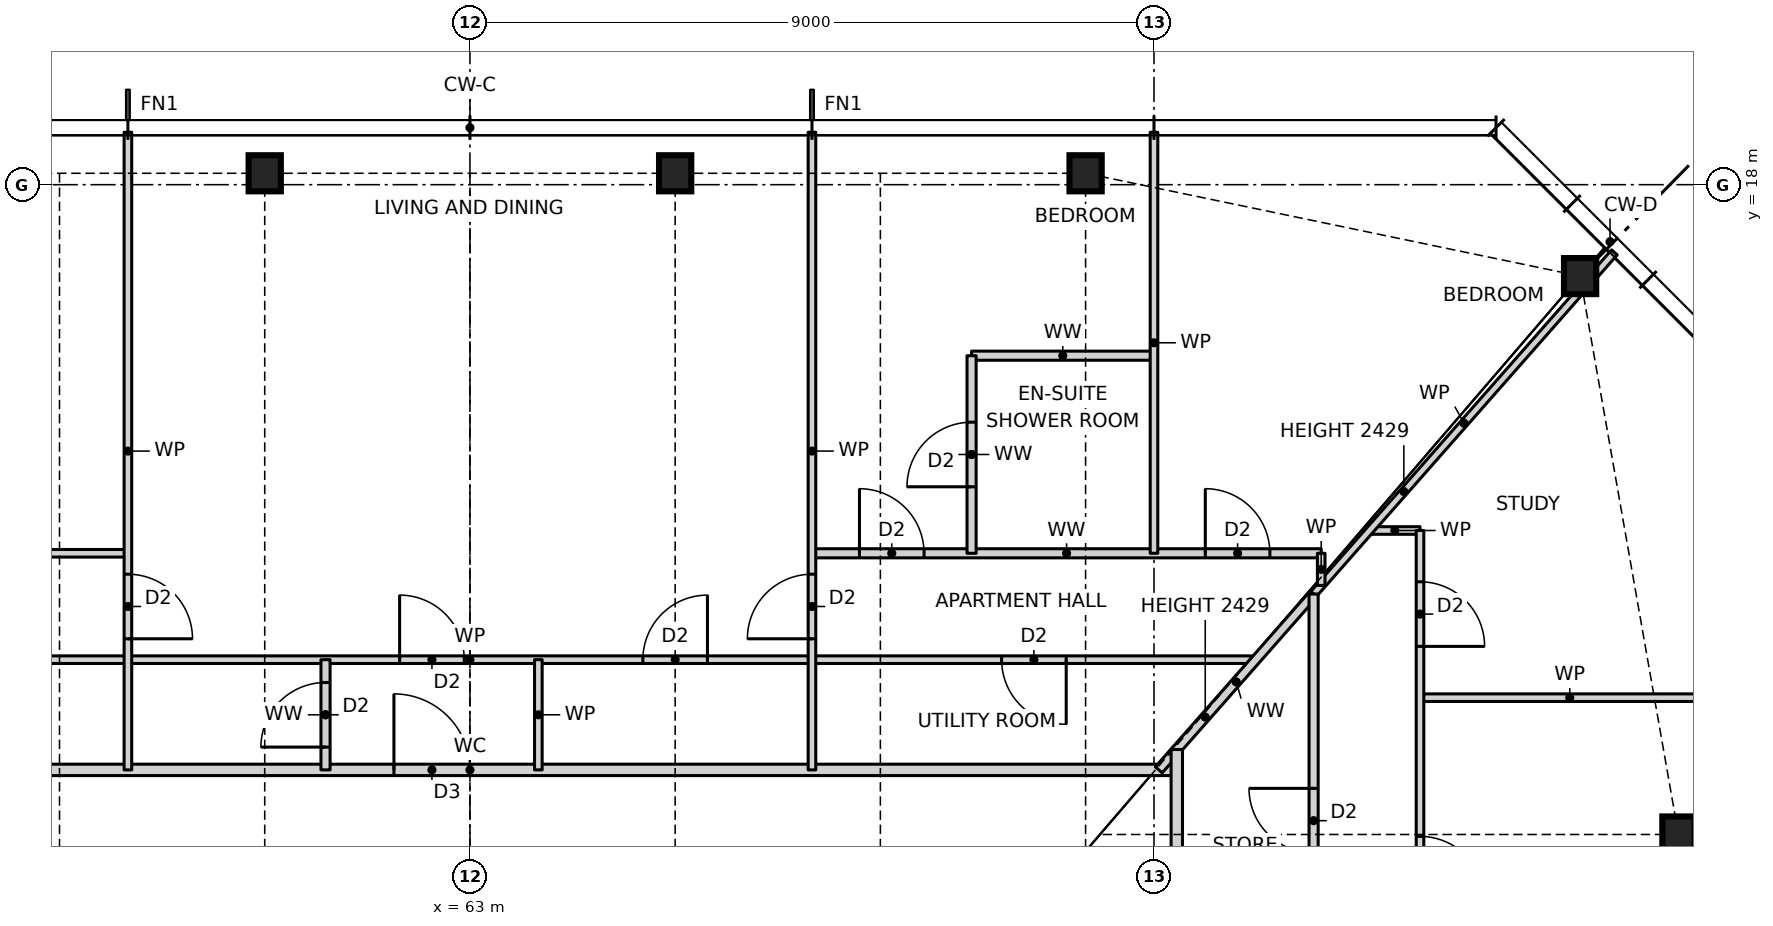
"""IFC4 building model, lengths in metres.
Left out: names, types, materials, properties, quantities, classifications, styles, units other than length and angle.
Written with IfcOpenShell. Run it as: python <this file> out.ifc"""

import sys

from ifc_helpers import new_model, si_unit, direction, frame, frame_2d, origin, origin_2d, place, context, subcontext, project, spatial, rectangle, i_section, extrude, element, fill, save


model = new_model("IFC4")
c1 = context("Model", 3, precision=1e-05, world=origin(), true_north=direction((0.0, 1.0)))
c2 = subcontext(c1, "Body", "Model", "MODEL_VIEW")
j1 = project(units=[si_unit("LENGTHUNIT", "METRE"), si_unit("PLANEANGLEUNIT", "RADIAN")], contexts=[c1])
p1 = place(None, origin())
s1 = spatial("IfcSite", under=j1, at=p1, CompositionType="ELEMENT")
p2 = place(p1, origin())
s2 = spatial("IfcBuilding", under=s1, at=p2, CompositionType="ELEMENT")
p3 = place(p2, frame((0.0, 0.0, 29.0)))
s3 = spatial("IfcBuildingStorey", under=s2, at=p3, CompositionType="ELEMENT", Elevation=29.0)
for number, where, z_axis, x_axis in (
    (1, (78.9, 9.45, 0.0), (0.0, 0.0, 1.0), (1.0, 0.0, 0.0)),
    (2, (77.606, 16.797, 0.0), (0.0, 0.0, 1.0), (1.0, 0.0, 0.0)),
    (3, (71.1, 18.15, 0.0), (0.0, 0.0, 1.0), (1.0, 0.0, 0.0)),
    (4, (65.7, 18.15, 0.0), (0.0, 0.0, 1.0), (1.0, 0.0, 0.0)),
    (5, (60.3, 18.15, 0.0), (0.0, 0.0, 1.0), (1.0, 0.0, 0.0)),
):
    element("IfcColumn", number, at=place(p3, frame(where, z_axis=z_axis, x_axis=x_axis)), inside=s3, PredefinedType="COLUMN", context=c2, shape_type="SweptSolid", body=[
        extrude(i_section(OverallWidth=0.424, OverallDepth=0.475, WebThickness=0.048, FlangeThickness=0.077, at=origin_2d()), origin(), (0.0, 0.0, 1.0), 3.5),
    ])
p4 = place(p3, frame((53.7, 10.3, 0.0), z_axis=(0.0, 0.0, 1.0), x_axis=(1.0, 0.0, 0.0)))
e6 = element("IfcWall", 6, at=p4, inside=s3, PredefinedType="PARTITIONING", context=c2, shape_type="SweptSolid", body=[
    extrude(rectangle(XDim=18.6, YDim=0.15, at=frame_2d((9.3, 0.0))), origin(), (0.0, 0.0, 1.0), 3.27),
])
p5 = place(p4, frame((8.3, 0.0, 0.0)))
e7 = element("IfcOpeningElement", 7, at=p5, cuts=e6, PredefinedType="OPENING", context=c2, shape_type="SweptSolid", body=[
    extrude(rectangle(XDim=1.0, YDim=2.1, at=frame_2d((0.5, 1.05))), frame((0.0, 0.085, 0.0), z_axis=(0.0, -1.0, 0.0), x_axis=(1.0, 0.0, 0.0)), (0.0, 0.0, 1.0), 0.17),
])
p6 = place(p3, frame((75.5, 11.25, 0.0), z_axis=(0.0, 0.0, 1.0), x_axis=(1.0, 0.0, 0.0)))
e8 = element("IfcWall", 8, at=p6, inside=s3, PredefinedType="PARTITIONING", context=c2, shape_type="SweptSolid", body=[
    extrude(rectangle(XDim=3.94, YDim=0.1, at=frame_2d((1.97, 0.0))), origin(), (0.0, 0.0, 1.0), 3.27),
])
p7 = place(p3, frame((52.66, 11.75, 0.0), z_axis=(0.0, 0.0, 1.0), x_axis=(1.0, 0.0, 0.0)))
e9 = element("IfcWall", 9, at=p7, inside=s3, PredefinedType="PARTITIONING", context=c2, shape_type="SweptSolid", body=[
    extrude(rectangle(XDim=20.68, YDim=0.1, at=frame_2d((10.34, 0.0))), origin(), (0.0, 0.0, 1.0), 3.27),
])
p8 = place(p7, frame((12.615, 0.0, 0.0)))
e10 = element("IfcOpeningElement", 10, at=p8, cuts=e9, PredefinedType="OPENING", context=c2, shape_type="SweptSolid", body=[
    extrude(rectangle(XDim=0.85, YDim=2.1, at=frame_2d((0.425, 1.05))), frame((0.0, 0.06, 0.0), z_axis=(0.0, -1.0, 0.0), x_axis=(1.0, 0.0, 0.0)), (0.0, 0.0, 1.0), 0.12),
])
p9 = place(p7, frame((9.415, 0.0, 0.0)))
e11 = element("IfcOpeningElement", 11, at=p9, cuts=e9, PredefinedType="OPENING", context=c2, shape_type="SweptSolid", body=[
    extrude(rectangle(XDim=0.85, YDim=2.1, at=frame_2d((0.425, 1.05))), frame((0.0, 0.06, 0.0), z_axis=(0.0, -1.0, 0.0), x_axis=(1.0, 0.0, 0.0)), (0.0, 0.0, 1.0), 0.12),
])
p10 = place(p7, frame((17.335, 0.0, 0.0)))
e12 = element("IfcOpeningElement", 12, at=p10, cuts=e9, PredefinedType="OPENING", context=c2, shape_type="SweptSolid", body=[
    extrude(rectangle(XDim=0.85, YDim=2.1, at=frame_2d((0.425, 1.05))), frame((0.0, 0.06, 0.0), z_axis=(0.0, -1.0, 0.0), x_axis=(1.0, 0.0, 0.0)), (0.0, 0.0, 1.0), 0.12),
])
p11 = place(p7, frame((2.495, 0.0, 0.0)))
e13 = element("IfcOpeningElement", 13, at=p11, cuts=e9, PredefinedType="OPENING", context=c2, shape_type="SweptSolid", body=[
    extrude(rectangle(XDim=0.85, YDim=2.1, at=frame_2d((0.425, 1.05))), frame((0.0, 0.06, 0.0), z_axis=(0.0, -1.0, 0.0), x_axis=(1.0, 0.0, 0.0)), (0.0, 0.0, 1.0), 0.12),
])
p12 = place(p3, frame((51.8, 13.15, 0.0), z_axis=(0.0, 0.0, 1.0), x_axis=(1.0, 0.0, 0.0)))
e14 = element("IfcWall", 14, at=p12, inside=s3, PredefinedType="PARTITIONING", context=c2, shape_type="SweptSolid", body=[
    extrude(rectangle(XDim=6.7, YDim=0.1, at=frame_2d((3.35, 0.0))), origin(), (0.0, 0.0, 1.0), 3.27),
])
p13 = place(p12, frame((4.025, 0.0, 0.0)))
e15 = element("IfcOpeningElement", 15, at=p13, cuts=e14, PredefinedType="OPENING", context=c2, shape_type="SweptSolid", body=[
    extrude(rectangle(XDim=0.85, YDim=2.1, at=frame_2d((0.425, 1.05))), frame((0.0, 0.06, 0.0), z_axis=(0.0, -1.0, 0.0), x_axis=(1.0, 0.0, 0.0)), (0.0, 0.0, 1.0), 0.12),
])
p14 = place(p12, frame((0.675, 0.0, 0.0)))
e16 = element("IfcOpeningElement", 16, at=p14, cuts=e14, PredefinedType="OPENING", context=c2, shape_type="SweptSolid", body=[
    extrude(rectangle(XDim=0.85, YDim=2.1, at=frame_2d((0.425, 1.05))), frame((0.0, 0.06, 0.0), z_axis=(0.0, -1.0, 0.0), x_axis=(1.0, 0.0, 0.0)), (0.0, 0.0, 1.0), 0.12),
])
p15 = place(p3, frame((67.5, 13.15, 0.0), z_axis=(0.0, 0.0, 1.0), x_axis=(1.0, 0.0, 0.0)))
e17 = element("IfcWall", 17, at=p15, inside=s3, PredefinedType="PARTITIONING", context=c2, shape_type="SweptSolid", body=[
    extrude(rectangle(XDim=6.7, YDim=0.12, at=frame_2d((3.35, 0.0))), origin(), (0.0, 0.0, 1.0), 3.27),
])
p16 = place(p15, frame((0.625, 0.0, 0.0)))
e18 = element("IfcOpeningElement", 18, at=p16, cuts=e17, PredefinedType="OPENING", context=c2, shape_type="SweptSolid", body=[
    extrude(rectangle(XDim=0.85, YDim=2.1, at=frame_2d((0.425, 1.05))), frame((0.0, 0.07, 0.0), z_axis=(0.0, -1.0, 0.0), x_axis=(1.0, 0.0, 0.0)), (0.0, 0.0, 1.0), 0.14),
])
p17 = place(p15, frame((5.175, 0.0, 0.0)))
e19 = element("IfcOpeningElement", 19, at=p17, cuts=e17, PredefinedType="OPENING", context=c2, shape_type="SweptSolid", body=[
    extrude(rectangle(XDim=0.85, YDim=2.1, at=frame_2d((0.425, 1.05))), frame((0.0, 0.07, 0.0), z_axis=(0.0, -1.0, 0.0), x_axis=(1.0, 0.0, 0.0)), (0.0, 0.0, 1.0), 0.14),
])
p18 = place(p3, frame((74.836, 13.45, 0.0), z_axis=(0.0, 0.0, 1.0), x_axis=(1.0, 0.0, 0.0)))
e20 = element("IfcWall", 20, at=p18, inside=s3, PredefinedType="PARTITIONING", context=c2, shape_type="SweptSolid", body=[
    extrude(rectangle(XDim=0.664, YDim=0.1, at=frame_2d((0.332, 0.0))), origin(), (0.0, 0.0, 1.0), 3.27),
])
p19 = place(p3, frame((69.6, 15.75, 0.0), z_axis=(0.0, 0.0, 1.0), x_axis=(1.0, 0.0, 0.0)))
e21 = element("IfcWall", 21, at=p19, inside=s3, PredefinedType="PARTITIONING", context=c2, shape_type="SweptSolid", body=[
    extrude(rectangle(XDim=2.4, YDim=0.12, at=frame_2d((1.2, 0.0))), origin(), (0.0, 0.0, 1.0), 3.27),
])
p20 = place(p3, frame((74.1, 12.614, 0.0), z_axis=(0.0, 0.0, 1.0), x_axis=(0.660755619739, 0.750601099775, 0.0)))
e22 = element("IfcWall", 22, at=p20, inside=s3, PredefinedType="PARTITIONING", context=c2, shape_type="SweptSolid", body=[
    extrude(rectangle(XDim=5.989, YDim=0.1, at=frame_2d((2.995, 0.0))), origin(), (0.0, 0.0, 1.0), 2.429),
])
p21 = place(p3, frame((72.063, 10.301, 0.0), z_axis=(0.0, 0.0, 1.0), x_axis=(0.660761820138, 0.750595641506, 0.0)))
e23 = element("IfcWall", 23, at=p21, inside=s3, PredefinedType="PARTITIONING", context=c2, shape_type="SweptSolid", body=[
    extrude(rectangle(XDim=3.082, YDim=0.12, at=frame_2d((1.541, 0.0))), origin(), (0.0, 0.0, 1.0), 2.429),
])
p22 = place(p3, frame((75.5, 2.25, 0.0), z_axis=(0.0, 0.0, 1.0), x_axis=(0.0, 1.0, 0.0)))
e24 = element("IfcWall", 24, at=p22, inside=s3, PredefinedType="PARTITIONING", context=c2, shape_type="SweptSolid", body=[
    extrude(rectangle(XDim=11.2, YDim=0.1, at=frame_2d((5.6, 0.0))), origin(), (0.0, 0.0, 1.0), 3.27),
])
p23 = place(p22, frame((1.825, 0.0, 0.0)))
e25 = element("IfcOpeningElement", 25, at=p23, cuts=e24, PredefinedType="OPENING", context=c2, shape_type="SweptSolid", body=[
    extrude(rectangle(XDim=0.85, YDim=2.1, at=frame_2d((0.425, 1.05))), frame((0.0, 0.06, 0.0), z_axis=(0.0, -1.0, 0.0), x_axis=(1.0, 0.0, 0.0)), (0.0, 0.0, 1.0), 0.12),
])
p24 = place(p22, frame((6.325, 0.0, 0.0)))
e26 = element("IfcOpeningElement", 26, at=p24, cuts=e24, PredefinedType="OPENING", context=c2, shape_type="SweptSolid", body=[
    extrude(rectangle(XDim=0.85, YDim=2.1, at=frame_2d((0.425, 1.05))), frame((0.0, 0.06, 0.0), z_axis=(0.0, -1.0, 0.0), x_axis=(1.0, 0.0, 0.0)), (0.0, 0.0, 1.0), 0.12),
])
p25 = place(p22, frame((9.675, 0.0, 0.0)))
e27 = element("IfcOpeningElement", 27, at=p25, cuts=e24, PredefinedType="OPENING", context=c2, shape_type="SweptSolid", body=[
    extrude(rectangle(XDim=0.85, YDim=2.1, at=frame_2d((0.425, 1.05))), frame((0.0, 0.06, 0.0), z_axis=(0.0, -1.0, 0.0), x_axis=(1.0, 0.0, 0.0)), (0.0, 0.0, 1.0), 0.12),
])
p26 = place(p3, frame((74.2, 12.727, 0.0), z_axis=(0.0, 0.0, 1.0), x_axis=(0.0, 1.0, 0.0)))
e28 = element("IfcWall", 28, at=p26, inside=s3, PredefinedType="PARTITIONING", context=c2, shape_type="SweptSolid", body=[
    extrude(rectangle(XDim=0.423, YDim=0.1, at=frame_2d((0.211, 0.0))), origin(), (0.0, 0.0, 1.0), 3.27),
])
p27 = place(p3, frame((74.1, -12.614, 0.0), z_axis=(0.0, 0.0, 1.0), x_axis=(0.0, 1.0, 0.0)))
e29 = element("IfcWall", 29, at=p27, inside=s3, PredefinedType="PARTITIONING", context=c2, shape_type="SweptSolid", body=[
    extrude(rectangle(XDim=25.228, YDim=0.12, at=frame_2d((12.614, 0.0))), origin(), (0.0, 0.0, 1.0), 3.27),
])
p28 = place(p27, frame((7.239, 0.0, 0.0)))
e30 = element("IfcOpeningElement", 30, at=p28, cuts=e29, PredefinedType="OPENING", context=c2, shape_type="SweptSolid", body=[
    extrude(rectangle(XDim=0.85, YDim=2.1, at=frame_2d((0.425, 1.05))), frame((0.0, 0.07, 0.0), z_axis=(0.0, -1.0, 0.0), x_axis=(1.0, 0.0, 0.0)), (0.0, 0.0, 1.0), 0.14),
])
p29 = place(p27, frame((10.439, 0.0, 0.0)))
e31 = element("IfcOpeningElement", 31, at=p29, cuts=e29, PredefinedType="OPENING", context=c2, shape_type="SweptSolid", body=[
    extrude(rectangle(XDim=0.85, YDim=2.1, at=frame_2d((0.425, 1.05))), frame((0.0, 0.07, 0.0), z_axis=(0.0, -1.0, 0.0), x_axis=(1.0, 0.0, 0.0)), (0.0, 0.0, 1.0), 0.14),
])
p30 = place(p27, frame((2.507, 0.0, 0.0)))
e32 = element("IfcOpeningElement", 32, at=p30, cuts=e29, PredefinedType="OPENING", context=c2, shape_type="SweptSolid", body=[
    extrude(rectangle(XDim=0.85, YDim=2.1, at=frame_2d((0.425, 1.05))), frame((0.0, 0.07, 0.0), z_axis=(0.0, -1.0, 0.0), x_axis=(1.0, 0.0, 0.0)), (0.0, 0.0, 1.0), 0.14),
])
p31 = place(p27, frame((16.639, 0.0, 0.0)))
e33 = element("IfcOpeningElement", 33, at=p31, cuts=e29, PredefinedType="OPENING", context=c2, shape_type="SweptSolid", body=[
    extrude(rectangle(XDim=0.85, YDim=2.1, at=frame_2d((0.425, 1.05))), frame((0.0, 0.07, 0.0), z_axis=(0.0, -1.0, 0.0), x_axis=(1.0, 0.0, 0.0)), (0.0, 0.0, 1.0), 0.14),
])
p32 = place(p27, frame((21.821, 0.0, 0.0)))
e34 = element("IfcOpeningElement", 34, at=p32, cuts=e29, PredefinedType="OPENING", context=c2, shape_type="SweptSolid", body=[
    extrude(rectangle(XDim=0.85, YDim=2.1, at=frame_2d((0.425, 1.05))), frame((0.0, 0.07, 0.0), z_axis=(0.0, -1.0, 0.0), x_axis=(1.0, 0.0, 0.0)), (0.0, 0.0, 1.0), 0.14),
])
p33 = place(p3, frame((72.3, -10.568, 0.0), z_axis=(0.0, 0.0, 1.0), x_axis=(0.0, 1.0, 0.0)))
e35 = element("IfcWall", 35, at=p33, inside=s3, PredefinedType="PARTITIONING", context=c2, shape_type="SweptSolid", body=[
    extrude(rectangle(XDim=21.136, YDim=0.15, at=frame_2d((10.568, 0.0))), origin(), (0.0, 0.0, 1.0), 3.27),
])
p34 = place(p33, frame((8.318, 0.0, 0.0)))
e36 = element("IfcOpeningElement", 36, at=p34, cuts=e35, PredefinedType="OPENING", context=c2, shape_type="SweptSolid", body=[
    extrude(rectangle(XDim=1.0, YDim=2.1, at=frame_2d((0.5, 1.05))), frame((0.0, 0.085, 0.0), z_axis=(0.0, -1.0, 0.0), x_axis=(1.0, 0.0, 0.0)), (0.0, 0.0, 1.0), 0.17),
])
p35 = place(p3, frame((72.0, 13.15, 0.0), z_axis=(0.0, 0.0, 1.0), x_axis=(0.0, 1.0, 0.0)))
e37 = element("IfcWall", 37, at=p35, inside=s3, PredefinedType="PARTITIONING", context=c2, shape_type="SweptSolid", body=[
    extrude(rectangle(XDim=5.54, YDim=0.1, at=frame_2d((2.77, 0.0))), origin(), (0.0, 0.0, 1.0), 3.27),
])
p36 = place(p3, frame((69.6, 13.15, 0.0), z_axis=(0.0, 0.0, 1.0), x_axis=(0.0, 1.0, 0.0)))
e38 = element("IfcWall", 38, at=p36, inside=s3, PredefinedType="PARTITIONING", context=c2, shape_type="SweptSolid", body=[
    extrude(rectangle(XDim=2.6, YDim=0.12, at=frame_2d((1.3, 0.0))), origin(), (0.0, 0.0, 1.0), 3.27),
])
p37 = place(p36, frame((0.875, 0.0, 0.0)))
e39 = element("IfcOpeningElement", 39, at=p37, cuts=e38, PredefinedType="OPENING", context=c2, shape_type="SweptSolid", body=[
    extrude(rectangle(XDim=0.85, YDim=2.1, at=frame_2d((0.425, 1.05))), frame((0.0, 0.07, 0.0), z_axis=(0.0, -1.0, 0.0), x_axis=(1.0, 0.0, 0.0)), (0.0, 0.0, 1.0), 0.14),
])
p38 = place(p3, frame((67.5, 10.3, 0.0), z_axis=(0.0, 0.0, 1.0), x_axis=(0.0, 1.0, 0.0)))
e40 = element("IfcWall", 40, at=p38, inside=s3, PredefinedType="PARTITIONING", context=c2, shape_type="SweptSolid", body=[
    extrude(rectangle(XDim=8.39, YDim=0.1, at=frame_2d((4.195, 0.0))), origin(), (0.0, 0.0, 1.0), 3.27),
])
p39 = place(p38, frame((1.725, 0.0, 0.0)))
e41 = element("IfcOpeningElement", 41, at=p39, cuts=e40, PredefinedType="OPENING", context=c2, shape_type="SweptSolid", body=[
    extrude(rectangle(XDim=0.85, YDim=2.1, at=frame_2d((0.425, 1.05))), frame((0.0, 0.06, 0.0), z_axis=(0.0, -1.0, 0.0), x_axis=(1.0, 0.0, 0.0)), (0.0, 0.0, 1.0), 0.12),
])
p40 = place(p3, frame((63.9, 10.3, 0.0), z_axis=(0.0, 0.0, 1.0), x_axis=(0.0, 1.0, 0.0)))
e42 = element("IfcWall", 42, at=p40, inside=s3, PredefinedType="PARTITIONING", context=c2, shape_type="SweptSolid", body=[
    extrude(rectangle(XDim=1.45, YDim=0.1, at=frame_2d((0.725, 0.0))), origin(), (0.0, 0.0, 1.0), 3.27),
])
p41 = place(p3, frame((61.1, 10.3, 0.0), z_axis=(0.0, 0.0, 1.0), x_axis=(0.0, 1.0, 0.0)))
e43 = element("IfcWall", 43, at=p41, inside=s3, PredefinedType="PARTITIONING", context=c2, shape_type="SweptSolid", body=[
    extrude(rectangle(XDim=1.45, YDim=0.12, at=frame_2d((0.725, 0.0))), origin(), (0.0, 0.0, 1.0), 3.27),
])
p42 = place(p41, frame((0.3, 0.0, 0.0)))
e44 = element("IfcOpeningElement", 44, at=p42, cuts=e43, PredefinedType="OPENING", context=c2, shape_type="SweptSolid", body=[
    extrude(rectangle(XDim=0.85, YDim=2.1, at=frame_2d((0.425, 1.05))), frame((0.0, 0.07, 0.0), z_axis=(0.0, -1.0, 0.0), x_axis=(1.0, 0.0, 0.0)), (0.0, 0.0, 1.0), 0.14),
])
p43 = place(p3, frame((58.5, 10.3, 0.0), z_axis=(0.0, 0.0, 1.0), x_axis=(0.0, 1.0, 0.0)))
e45 = element("IfcWall", 45, at=p43, inside=s3, PredefinedType="PARTITIONING", context=c2, shape_type="SweptSolid", body=[
    extrude(rectangle(XDim=8.39, YDim=0.1, at=frame_2d((4.195, 0.0))), origin(), (0.0, 0.0, 1.0), 3.27),
])
p44 = place(p43, frame((1.725, 0.0, 0.0)))
e46 = element("IfcOpeningElement", 46, at=p44, cuts=e45, PredefinedType="OPENING", context=c2, shape_type="SweptSolid", body=[
    extrude(rectangle(XDim=0.85, YDim=2.1, at=frame_2d((0.425, 1.05))), frame((0.0, 0.06, 0.0), z_axis=(0.0, -1.0, 0.0), x_axis=(1.0, 0.0, 0.0)), (0.0, 0.0, 1.0), 0.12),
])
p45 = place(p24, frame((0.85, 0.0, 0.0), z_axis=(0.0, 0.0, 1.0), x_axis=(-1.0, 0.0, 0.0)))
e47 = element("IfcDoor", 47, at=p45, inside=s3, OperationType="SINGLE_SWING_RIGHT", PredefinedType="DOOR", context=c2, shape_type="SweptSolid", body=[
    extrude(rectangle(XDim=0.85, YDim=2.1, at=frame_2d((0.425, 1.05))), frame((0.0, 0.025, 0.0), z_axis=(0.0, -1.0, 0.0), x_axis=(1.0, 0.0, 0.0)), (0.0, 0.0, 1.0), 0.05),
])
fill(e26, e47)
p46 = place(p25, frame((0.85, 0.0, 0.0), z_axis=(0.0, 0.0, 1.0), x_axis=(-1.0, 0.0, 0.0)))
e48 = element("IfcDoor", 48, at=p46, inside=s3, OperationType="SINGLE_SWING_RIGHT", PredefinedType="DOOR", context=c2, shape_type="SweptSolid", body=[
    extrude(rectangle(XDim=0.85, YDim=2.1, at=frame_2d((0.425, 1.05))), frame((0.0, 0.025, 0.0), z_axis=(0.0, -1.0, 0.0), x_axis=(1.0, 0.0, 0.0)), (0.0, 0.0, 1.0), 0.05),
])
fill(e27, e48)
p47 = place(p32, origin())
e49 = element("IfcDoor", 49, at=p47, inside=s3, OperationType="SINGLE_SWING_RIGHT", PredefinedType="DOOR", context=c2, shape_type="SweptSolid", body=[
    extrude(rectangle(XDim=0.85, YDim=2.1, at=frame_2d((0.425, 1.05))), frame((0.0, 0.025, 0.0), z_axis=(0.0, -1.0, 0.0), x_axis=(1.0, 0.0, 0.0)), (0.0, 0.0, 1.0), 0.05),
])
fill(e34, e49)
p48 = place(p8, origin())
e50 = element("IfcDoor", 50, at=p48, inside=s3, OperationType="SINGLE_SWING_RIGHT", PredefinedType="DOOR", context=c2, shape_type="SweptSolid", body=[
    extrude(rectangle(XDim=0.85, YDim=2.1, at=frame_2d((0.425, 1.05))), frame((0.0, 0.025, 0.0), z_axis=(0.0, -1.0, 0.0), x_axis=(1.0, 0.0, 0.0)), (0.0, 0.0, 1.0), 0.05),
])
fill(e10, e50)
p49 = place(p5, origin())
e51 = element("IfcDoor", 51, at=p49, inside=s3, OperationType="SINGLE_SWING_LEFT", PredefinedType="DOOR", context=c2, shape_type="SweptSolid", body=[
    extrude(rectangle(XDim=1.0, YDim=2.1, at=frame_2d((0.5, 1.05))), frame((0.0, 0.025, 0.0), z_axis=(0.0, -1.0, 0.0), x_axis=(1.0, 0.0, 0.0)), (0.0, 0.0, 1.0), 0.05),
])
fill(e7, e51)
p50 = place(p9, origin())
e52 = element("IfcDoor", 52, at=p50, inside=s3, OperationType="SINGLE_SWING_LEFT", PredefinedType="DOOR", context=c2, shape_type="SweptSolid", body=[
    extrude(rectangle(XDim=0.85, YDim=2.1, at=frame_2d((0.425, 1.05))), frame((0.0, 0.025, 0.0), z_axis=(0.0, -1.0, 0.0), x_axis=(1.0, 0.0, 0.0)), (0.0, 0.0, 1.0), 0.05),
])
fill(e11, e52)
p51 = place(p42, origin())
e53 = element("IfcDoor", 53, at=p51, inside=s3, OperationType="SINGLE_SWING_LEFT", PredefinedType="DOOR", context=c2, shape_type="SweptSolid", body=[
    extrude(rectangle(XDim=0.85, YDim=2.1, at=frame_2d((0.425, 1.05))), frame((0.0, 0.025, 0.0), z_axis=(0.0, -1.0, 0.0), x_axis=(1.0, 0.0, 0.0)), (0.0, 0.0, 1.0), 0.05),
])
fill(e44, e53)
p52 = place(p39, origin())
e54 = element("IfcDoor", 54, at=p52, inside=s3, OperationType="SINGLE_SWING_LEFT", PredefinedType="DOOR", context=c2, shape_type="SweptSolid", body=[
    extrude(rectangle(XDim=0.85, YDim=2.1, at=frame_2d((0.425, 1.05))), frame((0.0, 0.025, 0.0), z_axis=(0.0, -1.0, 0.0), x_axis=(1.0, 0.0, 0.0)), (0.0, 0.0, 1.0), 0.05),
])
fill(e41, e54)
p53 = place(p37, origin())
e55 = element("IfcDoor", 55, at=p53, inside=s3, OperationType="SINGLE_SWING_LEFT", PredefinedType="DOOR", context=c2, shape_type="SweptSolid", body=[
    extrude(rectangle(XDim=0.85, YDim=2.1, at=frame_2d((0.425, 1.05))), frame((0.0, 0.025, 0.0), z_axis=(0.0, -1.0, 0.0), x_axis=(1.0, 0.0, 0.0)), (0.0, 0.0, 1.0), 0.05),
])
fill(e39, e55)
p54 = place(p16, origin())
e56 = element("IfcDoor", 56, at=p54, inside=s3, OperationType="SINGLE_SWING_LEFT", PredefinedType="DOOR", context=c2, shape_type="SweptSolid", body=[
    extrude(rectangle(XDim=0.85, YDim=2.1, at=frame_2d((0.425, 1.05))), frame((0.0, 0.025, 0.0), z_axis=(0.0, -1.0, 0.0), x_axis=(1.0, 0.0, 0.0)), (0.0, 0.0, 1.0), 0.05),
])
fill(e18, e56)
p55 = place(p17, origin())
e57 = element("IfcDoor", 57, at=p55, inside=s3, OperationType="SINGLE_SWING_LEFT", PredefinedType="DOOR", context=c2, shape_type="SweptSolid", body=[
    extrude(rectangle(XDim=0.85, YDim=2.1, at=frame_2d((0.425, 1.05))), frame((0.0, 0.025, 0.0), z_axis=(0.0, -1.0, 0.0), x_axis=(1.0, 0.0, 0.0)), (0.0, 0.0, 1.0), 0.05),
])
fill(e19, e57)
p56 = place(p10, frame((0.85, 0.0, 0.0), z_axis=(0.0, 0.0, 1.0), x_axis=(-1.0, 0.0, 0.0)))
e58 = element("IfcDoor", 58, at=p56, inside=s3, OperationType="SINGLE_SWING_LEFT", PredefinedType="DOOR", context=c2, shape_type="SweptSolid", body=[
    extrude(rectangle(XDim=0.85, YDim=2.1, at=frame_2d((0.425, 1.05))), frame((0.0, 0.025, 0.0), z_axis=(0.0, -1.0, 0.0), x_axis=(1.0, 0.0, 0.0)), (0.0, 0.0, 1.0), 0.05),
])
fill(e12, e58)
p57 = place(p44, frame((0.85, 0.0, 0.0), z_axis=(0.0, 0.0, 1.0), x_axis=(-1.0, 0.0, 0.0)))
e59 = element("IfcDoor", 59, at=p57, inside=s3, OperationType="SINGLE_SWING_RIGHT", PredefinedType="DOOR", context=c2, shape_type="SweptSolid", body=[
    extrude(rectangle(XDim=0.85, YDim=2.1, at=frame_2d((0.425, 1.05))), frame((0.0, 0.025, 0.0), z_axis=(0.0, -1.0, 0.0), x_axis=(1.0, 0.0, 0.0)), (0.0, 0.0, 1.0), 0.05),
])
fill(e46, e59)
save(model, sys.argv[1])
